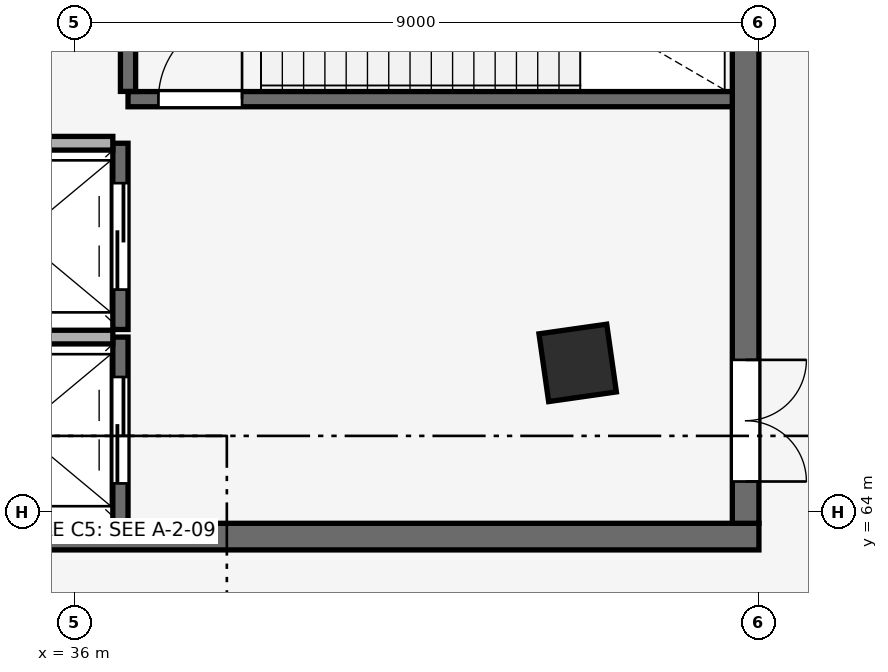
"""IFC4 building model, lengths in metres.
Left out: names, types, materials, properties, quantities, classifications, styles, units other than length and angle.
Written with IfcOpenShell. Run it as: python <this file> out.ifc"""

import sys

from ifc_helpers import new_model, si_unit, direction, frame, frame_2d, origin, origin_2d, place, context, subcontext, project, spatial, rectangle, extrude, element, fill, save


model = new_model("IFC4")
c1 = context("Model", 3, precision=1e-05, world=origin(), true_north=direction((0.0, 1.0)))
c2 = subcontext(c1, "Body", "Model", "MODEL_VIEW")
j1 = project(units=[si_unit("LENGTHUNIT", "METRE"), si_unit("PLANEANGLEUNIT", "RADIAN")], contexts=[c1])
p1 = place(None, origin())
s1 = spatial("IfcSite", under=j1, at=p1, CompositionType="ELEMENT")
p2 = place(p1, origin())
s2 = spatial("IfcBuilding", under=s1, at=p2, CompositionType="ELEMENT")
p3 = place(p2, origin())
s3 = spatial("IfcBuildingStorey", under=s2, at=p3, CompositionType="ELEMENT", Elevation=0.0)
p4 = place(p3, frame((42.615, 65.96, 0.0), z_axis=(0.0, 0.0, 1.0), x_axis=(-0.989999050734, -0.141074021516, 0.0)))
e1 = element("IfcColumn", 1, at=p4, inside=s3, PredefinedType="COLUMN", context=c2, shape_type="SweptSolid", body=[
    extrude(rectangle(XDim=0.9, YDim=0.9, at=origin_2d()), origin(), (0.0, 0.0, 1.0), 5.4),
])
p5 = place(p3, frame((33.6, 63.675, 0.0), z_axis=(0.0, 0.0, 1.0), x_axis=(1.0, 0.0, 0.0)))
e2 = element("IfcWall", 2, at=p5, inside=s3, PredefinedType="SHEAR", context=c2, shape_type="SweptSolid", body=[
    extrude(rectangle(XDim=11.4, YDim=0.35, at=frame_2d((5.7, 0.0))), origin(), (0.0, 0.0, 1.0), 5.4),
])
p6 = place(p3, frame((44.825, 63.85, 0.0), z_axis=(0.0, 0.0, 1.0), x_axis=(0.0, 1.0, 0.0)))
e3 = element("IfcWall", 3, at=p6, inside=s3, PredefinedType="SHEAR", context=c2, shape_type="SweptSolid", body=[
    extrude(rectangle(XDim=9.3, YDim=0.35, at=frame_2d((4.65, 0.0))), origin(), (0.0, 0.0, 1.0), 5.4),
])
p7 = place(p6, frame((0.55, 0.0, 0.0)))
e4 = element("IfcOpeningElement", 4, at=p7, cuts=e3, PredefinedType="OPENING", context=c2, shape_type="SweptSolid", body=[
    extrude(rectangle(XDim=1.6, YDim=2.2, at=frame_2d((0.8, 1.1))), frame((0.0, 0.185, 0.0), z_axis=(0.0, -1.0, 0.0), x_axis=(1.0, 0.0, 0.0)), (0.0, 0.0, 1.0), 0.37),
])
p8 = place(p3, frame((36.6, 63.85, 0.0), z_axis=(0.0, 0.0, 1.0), x_axis=(0.0, 1.0, 0.0)))
e5 = element("IfcWall", 5, at=p8, inside=s3, PredefinedType="SHEAR", context=c2, shape_type="SweptSolid", body=[
    extrude(rectangle(XDim=2.45, YDim=0.2, at=frame_2d((1.225, 0.0))), origin(), (0.0, 0.0, 1.0), 5.12),
])
p9 = place(p8, frame((0.525, 0.0, 0.0)))
e6 = element("IfcOpeningElement", 6, at=p9, cuts=e5, PredefinedType="OPENING", context=c2, shape_type="SweptSolid", body=[
    extrude(rectangle(XDim=1.4, YDim=2.2, at=frame_2d((0.7, 1.1))), frame((0.0, 0.11, 0.0), z_axis=(0.0, -1.0, 0.0), x_axis=(1.0, 0.0, 0.0)), (0.0, 0.0, 1.0), 0.22),
])
p10 = place(p3, frame((34.05, 66.3, 0.0), z_axis=(0.0, 0.0, 1.0), x_axis=(1.0, 0.0, 0.0)))
e7 = element("IfcWall", 7, at=p10, inside=s3, PredefinedType="PARTITIONING", context=c2, shape_type="SweptSolid", body=[
    extrude(rectangle(XDim=2.45, YDim=0.18, at=frame_2d((1.225, 0.0))), origin(), (0.0, 0.0, 1.0), 5.4),
])
p11 = place(p3, frame((36.6, 66.4, 0.0), z_axis=(0.0, 0.0, 1.0), x_axis=(0.0, 1.0, 0.0)))
e8 = element("IfcWall", 8, at=p11, inside=s3, PredefinedType="SHEAR", context=c2, shape_type="SweptSolid", body=[
    extrude(rectangle(XDim=2.45, YDim=0.2, at=frame_2d((1.225, 0.0))), origin(), (0.0, 0.0, 1.0), 5.12),
])
p12 = place(p11, frame((0.525, 0.0, 0.0)))
e9 = element("IfcOpeningElement", 9, at=p12, cuts=e8, PredefinedType="OPENING", context=c2, shape_type="SweptSolid", body=[
    extrude(rectangle(XDim=1.4, YDim=2.2, at=frame_2d((0.7, 1.1))), frame((0.0, 0.11, 0.0), z_axis=(0.0, -1.0, 0.0), x_axis=(1.0, 0.0, 0.0)), (0.0, 0.0, 1.0), 0.22),
])
p13 = place(p3, frame((34.05, 68.85, 0.0), z_axis=(0.0, 0.0, 1.0), x_axis=(1.0, 0.0, 0.0)))
e10 = element("IfcWall", 10, at=p13, inside=s3, PredefinedType="PARTITIONING", context=c2, shape_type="SweptSolid", body=[
    extrude(rectangle(XDim=2.45, YDim=0.18, at=frame_2d((1.225, 0.0))), origin(), (0.0, 0.0, 1.0), 5.4),
])
p14 = place(p3, frame((36.7, 69.43, 0.0), z_axis=(0.0, 0.0, 1.0), x_axis=(1.0, 0.0, 0.0)))
e11 = element("IfcWall", 11, at=p14, inside=s3, PredefinedType="SHEAR", context=c2, shape_type="SweptSolid", body=[
    extrude(rectangle(XDim=7.95, YDim=0.2, at=frame_2d((3.975, 0.0))), origin(), (0.0, 0.0, 1.0), 5.4),
])
p15 = place(p14, frame((0.4, 0.0, 0.0)))
e12 = element("IfcOpeningElement", 12, at=p15, cuts=e11, PredefinedType="OPENING", context=c2, shape_type="SweptSolid", body=[
    extrude(rectangle(XDim=1.1, YDim=2.15, at=frame_2d((0.55, 1.075))), frame((0.0, 0.11, 0.0), z_axis=(0.0, -1.0, 0.0), x_axis=(1.0, 0.0, 0.0)), (0.0, 0.0, 1.0), 0.22),
])
p16 = place(p3, frame((36.7, 69.532, 0.0), z_axis=(0.0, 0.0, 1.0), x_axis=(0.0, 1.0, 0.0)))
e13 = element("IfcWall", 13, at=p16, inside=s3, PredefinedType="SHEAR", context=c2, shape_type="SweptSolid", body=[
    extrude(rectangle(XDim=3.586, YDim=0.2, at=frame_2d((1.793, 0.0))), origin(), (0.0, 0.0, 1.0), 5.4),
])
p17 = place(p9, origin())
e14 = element("IfcDoor", 14, at=p17, inside=s3, OperationType="DOUBLE_DOOR_SLIDING", PredefinedType="DOOR", context=c2, shape_type="SweptSolid", body=[
    extrude(rectangle(XDim=1.4, YDim=2.2, at=frame_2d((0.7, 1.1))), frame((0.0, 0.025, 0.0), z_axis=(0.0, -1.0, 0.0), x_axis=(1.0, 0.0, 0.0)), (0.0, 0.0, 1.0), 0.05),
])
fill(e6, e14)
p18 = place(p12, origin())
e15 = element("IfcDoor", 15, at=p18, inside=s3, OperationType="DOUBLE_DOOR_SLIDING", PredefinedType="DOOR", context=c2, shape_type="SweptSolid", body=[
    extrude(rectangle(XDim=1.4, YDim=2.2, at=frame_2d((0.7, 1.1))), frame((0.0, 0.025, 0.0), z_axis=(0.0, -1.0, 0.0), x_axis=(1.0, 0.0, 0.0)), (0.0, 0.0, 1.0), 0.05),
])
fill(e9, e15)
p19 = place(p15, frame((1.1, 0.0, 0.0), z_axis=(0.0, 0.0, 1.0), x_axis=(-1.0, 0.0, 0.0)))
e16 = element("IfcDoor", 16, at=p19, inside=s3, OperationType="SINGLE_SWING_LEFT", PredefinedType="DOOR", context=c2, shape_type="SweptSolid", body=[
    extrude(rectangle(XDim=1.1, YDim=2.15, at=frame_2d((0.55, 1.075))), frame((0.0, 0.025, 0.0), z_axis=(0.0, -1.0, 0.0), x_axis=(1.0, 0.0, 0.0)), (0.0, 0.0, 1.0), 0.05),
])
fill(e12, e16)
p20 = place(p7, frame((1.6, 0.0, 0.0), z_axis=(0.0, 0.0, 1.0), x_axis=(-1.0, 0.0, 0.0)))
e17 = element("IfcDoor", 17, at=p20, inside=s3, OperationType="DOUBLE_DOOR_SINGLE_SWING", PredefinedType="DOOR", context=c2, shape_type="SweptSolid", body=[
    extrude(rectangle(XDim=1.6, YDim=2.2, at=frame_2d((0.8, 1.1))), frame((0.0, 0.025, 0.0), z_axis=(0.0, -1.0, 0.0), x_axis=(1.0, 0.0, 0.0)), (0.0, 0.0, 1.0), 0.05),
])
fill(e4, e17)
save(model, sys.argv[1])
